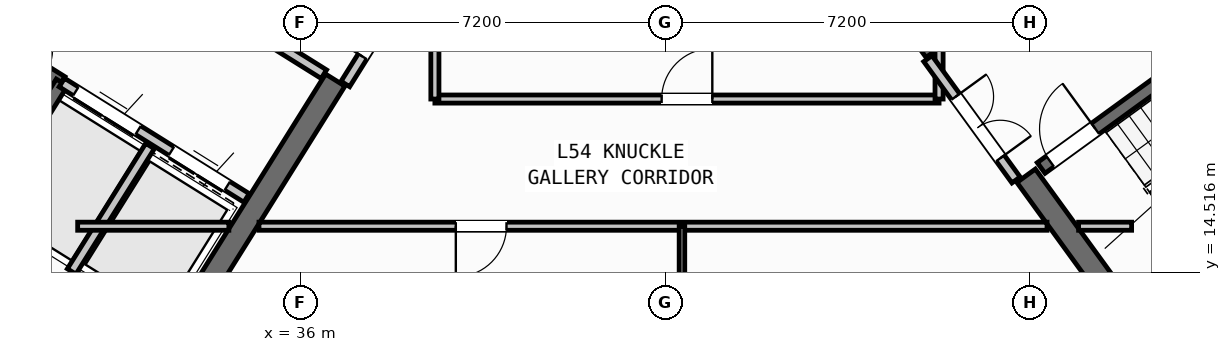
"""IFC4 building model, lengths in metres.
Left out: names, types, materials, properties, quantities, classifications, styles, units other than length and angle.
Written with IfcOpenShell. Run it as: python <this file> out.ifc"""

import sys

from ifc_helpers import new_model, si_unit, direction, frame, frame_2d, origin, place, context, subcontext, project, spatial, rectangle, extrude, source, transform, mapped, element, fill, save


model = new_model("IFC4")
c1 = context("Model", 3, precision=1e-05, world=origin(), true_north=direction((0.0, 1.0)))
c2 = subcontext(c1, "Body", "Model", "MODEL_VIEW")
j1 = project(units=[si_unit("LENGTHUNIT", "METRE"), si_unit("PLANEANGLEUNIT", "RADIAN")], contexts=[c1])
p1 = place(None, origin())
s1 = spatial("IfcSite", under=j1, at=p1, CompositionType="ELEMENT")
p2 = place(p1, origin())
s2 = spatial("IfcBuilding", under=s1, at=p2, CompositionType="ELEMENT")
p3 = place(p2, frame((0.0, 0.0, 214.8)))
s3 = spatial("IfcBuildingStorey", under=s2, at=p3, CompositionType="ELEMENT", Elevation=214.8)
p4 = place(p3, frame((33.324, 12.503, 0.0), z_axis=(0.0, 0.0, 1.0), x_axis=(-0.848043529849, 0.529926571782, 0.0)))
e1 = element("IfcWall", 1, at=p4, inside=s3, PredefinedType="SHEAR", context=c2, shape_type="SweptSolid", body=[
    extrude(rectangle(XDim=13.04, YDim=0.45, at=frame_2d((6.52, 0.0))), origin(), (0.0, 0.0, 1.0), 3.35),
])
p5 = place(p3, frame((36.683, 18.304, 0.0), z_axis=(0.0, 0.0, 1.0), x_axis=(-0.529904039071, -0.848057609704, 0.0)))
e2 = element("IfcWall", 2, at=p5, inside=s3, PredefinedType="SHEAR", context=c2, shape_type="SweptSolid", body=[
    extrude(rectangle(XDim=6.475, YDim=0.45, at=frame_2d((3.238, 0.0))), origin(), (0.0, 0.0, 1.0), 3.35),
])
p6 = place(p3, frame((52.399, 13.169, 0.0), z_axis=(0.0, 0.0, 1.0), x_axis=(0.809022352778, 0.587777877013, 0.0)))
e3 = element("IfcWall", 3, at=p6, inside=s3, PredefinedType="SHEAR", context=c2, shape_type="SweptSolid", body=[
    extrude(rectangle(XDim=12.24, YDim=0.45, at=frame_2d((6.12, 0.0))), origin(), (0.0, 0.0, 1.0), 3.35),
])
p7 = place(p3, frame((52.449, 13.483, 0.0), z_axis=(0.0, 0.0, 1.0), x_axis=(-0.587819244441, 0.808992296542, 0.0)))
e4 = element("IfcWall", 4, at=p7, inside=s3, PredefinedType="SHEAR", context=c2, shape_type="SweptSolid", body=[
    extrude(rectangle(XDim=3.625, YDim=0.45, at=frame_2d((1.812, 0.0))), origin(), (0.0, 0.0, 1.0), 3.35),
])
p8 = place(p3, frame((48.526, 18.884, 0.0), z_axis=(0.0, 0.0, 1.0), x_axis=(-0.587774812919, 0.809024578921, 0.0)))
e5 = element("IfcWall", 5, at=p8, inside=s3, PredefinedType="SHEAR", context=c2, shape_type="SweptSolid", body=[
    extrude(rectangle(XDim=6.475, YDim=0.45, at=frame_2d((3.238, 0.0))), origin(), (0.0, 0.0, 1.0), 3.35),
])
p9 = place(p3, frame((31.76, 12.183, 0.0), z_axis=(0.0, 0.0, 1.0), x_axis=(-0.848047074256, 0.529920899612, 0.0)))
e6 = element("IfcWall", 6, at=p9, inside=s3, PredefinedType="STANDARD", context=c2, shape_type="SweptSolid", body=[
    extrude(rectangle(XDim=30.652, YDim=0.32, at=frame_2d((15.326, 0.0))), origin(), (0.0, 0.0, 1.0), 3.35),
])
p10 = place(p9, frame((15.166, 0.0, 0.0)))
e7 = element("IfcOpeningElement", 7, at=p10, cuts=e6, PredefinedType="OPENING", context=c2, shape_type="SweptSolid", body=[
    extrude(rectangle(XDim=1.2, YDim=2.15, at=frame_2d((0.6, 1.075))), frame((0.0, 0.17, 0.0), z_axis=(0.0, -1.0, 0.0), x_axis=(1.0, 0.0, 0.0)), (0.0, 0.0, 1.0), 0.34),
])
p11 = place(p9, frame((2.24, 0.0, 0.9)))
e8 = element("IfcOpeningElement", 8, at=p11, cuts=e6, PredefinedType="OPENING", context=c2, shape_type="SweptSolid", body=[
    extrude(rectangle(XDim=1.65, YDim=1.45, at=frame_2d((0.825, 0.725))), frame((0.0, 0.17, 0.0), z_axis=(0.0, -1.0, 0.0), x_axis=(1.0, 0.0, 0.0)), (0.0, 0.0, 1.0), 0.34),
])
p12 = place(p9, frame((7.469, 0.0, 0.9)))
e9 = element("IfcOpeningElement", 9, at=p12, cuts=e6, PredefinedType="OPENING", context=c2, shape_type="SweptSolid", body=[
    extrude(rectangle(XDim=1.65, YDim=1.45, at=frame_2d((0.825, 0.725))), frame((0.0, 0.17, 0.0), z_axis=(0.0, -1.0, 0.0), x_axis=(1.0, 0.0, 0.0)), (0.0, 0.0, 1.0), 0.34),
])
p13 = place(p9, frame((12.623, 0.0, 1.0)))
e10 = element("IfcOpeningElement", 10, at=p13, cuts=e6, PredefinedType="OPENING", context=c2, shape_type="SweptSolid", body=[
    extrude(rectangle(XDim=0.9, YDim=1.25, at=frame_2d((0.45, 0.625))), frame((0.0, 0.17, 0.0), z_axis=(0.0, -1.0, 0.0), x_axis=(1.0, 0.0, 0.0)), (0.0, 0.0, 1.0), 0.34),
])
p14 = place(p9, frame((19.715, 0.0, 1.0)))
e11 = element("IfcOpeningElement", 11, at=p14, cuts=e6, PredefinedType="OPENING", context=c2, shape_type="SweptSolid", body=[
    extrude(rectangle(XDim=0.9, YDim=1.25, at=frame_2d((0.45, 0.625))), frame((0.0, 0.17, 0.0), z_axis=(0.0, -1.0, 0.0), x_axis=(1.0, 0.0, 0.0)), (0.0, 0.0, 1.0), 0.34),
])
p15 = place(p9, frame((25.566, 0.0, 0.9)))
e12 = element("IfcOpeningElement", 12, at=p15, cuts=e6, PredefinedType="OPENING", context=c2, shape_type="SweptSolid", body=[
    extrude(rectangle(XDim=1.65, YDim=1.45, at=frame_2d((0.825, 0.725))), frame((0.0, 0.17, 0.0), z_axis=(0.0, -1.0, 0.0), x_axis=(1.0, 0.0, 0.0)), (0.0, 0.0, 1.0), 0.34),
])
p16 = place(p9, frame((28.896, 0.0, 1.0)))
e13 = element("IfcOpeningElement", 13, at=p16, cuts=e6, PredefinedType="OPENING", context=c2, shape_type="SweptSolid", body=[
    extrude(rectangle(XDim=0.9, YDim=1.25, at=frame_2d((0.45, 0.625))), frame((0.0, 0.17, 0.0), z_axis=(0.0, -1.0, 0.0), x_axis=(1.0, 0.0, 0.0)), (0.0, 0.0, 1.0), 0.34),
])
p17 = place(p3, frame((31.28, 18.261, 0.0), z_axis=(0.0, 0.0, 1.0), x_axis=(-0.848051618787, 0.529913626805, 0.0)))
e14 = element("IfcWall", 14, at=p17, inside=s3, PredefinedType="SHEAR", context=c2, shape_type="SweptSolid", body=[
    extrude(rectangle(XDim=7.46, YDim=0.26, at=frame_2d((3.73, 0.0))), origin(), (0.0, 0.0, 1.0), 3.35),
])
p18 = place(p17, frame((0.36, 0.0, 0.0)))
e15 = element("IfcOpeningElement", 15, at=p18, cuts=e14, PredefinedType="OPENING", context=c2, shape_type="SweptSolid", body=[
    extrude(rectangle(XDim=0.86, YDim=2.05, at=frame_2d((0.43, 1.025))), frame((0.0, 0.14, 0.0), z_axis=(0.0, -1.0, 0.0), x_axis=(1.0, 0.0, 0.0)), (0.0, 0.0, 1.0), 0.28),
])
p19 = place(p3, frame((31.288, 18.256, 0.0), z_axis=(0.0, 0.0, 1.0), x_axis=(-0.529943379326, -0.848033026897, 0.0)))
e16 = element("IfcWall", 16, at=p19, inside=s3, PredefinedType="SHEAR", context=c2, shape_type="SweptSolid", body=[
    extrude(rectangle(XDim=3.16, YDim=0.26, at=frame_2d((1.58, 0.0))), origin(), (0.0, 0.0, 1.0), 3.35),
])
p20 = place(p3, frame((34.933, 15.978, 0.0), z_axis=(0.0, 0.0, 1.0), x_axis=(-0.848055739377, 0.529907032327, 0.0)))
e17 = element("IfcWall", 17, at=p20, inside=s3, PredefinedType="STANDARD", context=c2, shape_type="SweptSolid", body=[
    extrude(rectangle(XDim=4.298, YDim=0.2, at=frame_2d((2.149, 0.0))), origin(), (0.0, 0.0, 1.0), 3.34),
])
p21 = place(p20, frame((0.448, 0.0, 0.0)))
e18 = element("IfcOpeningElement", 18, at=p21, cuts=e17, PredefinedType="OPENING", context=c2, shape_type="SweptSolid", body=[
    extrude(rectangle(XDim=1.3, YDim=2.2, at=frame_2d((0.65, 1.1))), frame((0.0, 0.11, 0.0), z_axis=(0.0, -1.0, 0.0), x_axis=(1.0, 0.0, 0.0)), (0.0, 0.0, 1.0), 0.22),
])
p22 = place(p20, frame((2.523, 0.0, 0.0)))
e19 = element("IfcOpeningElement", 19, at=p22, cuts=e17, PredefinedType="OPENING", context=c2, shape_type="SweptSolid", body=[
    extrude(rectangle(XDim=1.45, YDim=2.25, at=frame_2d((0.725, 1.125))), frame((0.0, 0.11, 0.0), z_axis=(0.0, -1.0, 0.0), x_axis=(1.0, 0.0, 0.0)), (0.0, 0.0, 1.0), 0.22),
])
p23 = place(p3, frame((36.459, 18.421, 0.0), z_axis=(0.0, 0.0, 1.0), x_axis=(-0.848059591691, 0.529900867089, 0.0)))
e20 = element("IfcWall", 20, at=p23, inside=s3, PredefinedType="STANDARD", context=c2, shape_type="SweptSolid", body=[
    extrude(rectangle(XDim=5.818, YDim=0.2, at=frame_2d((2.909, 0.0))), origin(), (0.0, 0.0, 1.0), 3.34),
])
p24 = place(p23, frame((2.598, 0.0, 0.0)))
e21 = element("IfcOpeningElement", 21, at=p24, cuts=e20, PredefinedType="OPENING", context=c2, shape_type="SweptSolid", body=[
    extrude(rectangle(XDim=1.15, YDim=2.1, at=frame_2d((0.575, 1.05))), frame((0.0, 0.11, 0.0), z_axis=(0.0, -1.0, 0.0), x_axis=(1.0, 0.0, 0.0)), (0.0, 0.0, 1.0), 0.22),
])
p25 = place(p3, frame((33.029, 17.003, 0.0), z_axis=(0.0, 0.0, 1.0), x_axis=(-0.529916267533, -0.848049968695, 0.0)))
e22 = element("IfcWall", 22, at=p25, inside=s3, PredefinedType="STANDARD", context=c2, shape_type="SweptSolid", body=[
    extrude(rectangle(XDim=2.92, YDim=0.2, at=frame_2d((1.46, 0.0))), origin(), (0.0, 0.0, 1.0), 3.34),
])
p26 = place(p3, frame((52.472, 14.013, 0.0), z_axis=(0.0, 0.0, 1.0), x_axis=(0.809028366311, 0.587769599847, 0.0)))
e23 = element("IfcWall", 23, at=p26, inside=s3, PredefinedType="SHEAR", context=c2, shape_type="SweptSolid", body=[
    extrude(rectangle(XDim=7.33, YDim=0.26, at=frame_2d((3.665, 0.0))), origin(), (0.0, 0.0, 1.0), 3.35),
])
p27 = place(p3, frame((50.615, 16.57, 0.0), z_axis=(0.0, 0.0, 1.0), x_axis=(0.809028366311, 0.587769599847, 0.0)))
e24 = element("IfcWall", 24, at=p27, inside=s3, PredefinedType="SHEAR", context=c2, shape_type="SweptSolid", body=[
    extrude(rectangle(XDim=7.33, YDim=0.26, at=frame_2d((3.665, 0.0))), origin(), (0.0, 0.0, 1.0), 3.35),
])
p28 = place(p27, frame((0.22, 0.0, 0.0)))
e25 = element("IfcOpeningElement", 25, at=p28, cuts=e24, PredefinedType="OPENING", context=c2, shape_type="SweptSolid", body=[
    extrude(rectangle(XDim=1.1, YDim=2.1, at=frame_2d((0.55, 1.05))), frame((0.0, 0.14, 0.0), z_axis=(0.0, -1.0, 0.0), x_axis=(1.0, 0.0, 0.0)), (0.0, 0.0, 1.0), 0.28),
])
p29 = place(p3, frame((38.451, 20.737, 0.0), z_axis=(0.0, 0.0, 1.0), x_axis=(-0.529924799939, -0.848044637038, 0.0)))
e26 = element("IfcWall", 26, at=p29, inside=s3, PredefinedType="STANDARD", context=c2, shape_type="SweptSolid", body=[
    extrude(rectangle(XDim=2.96, YDim=0.2, at=frame_2d((1.48, 0.0))), origin(), (0.0, 0.0, 1.0), 3.34),
])
p30 = place(p29, frame((1.46, 0.0, 0.0)))
e27 = element("IfcOpeningElement", 27, at=p30, cuts=e26, PredefinedType="OPENING", context=c2, shape_type="SweptSolid", body=[
    extrude(rectangle(XDim=0.86, YDim=2.05, at=frame_2d((0.43, 1.025))), frame((0.0, 0.11, 0.0), z_axis=(0.0, -1.0, 0.0), x_axis=(1.0, 0.0, 0.0)), (0.0, 0.0, 1.0), 0.22),
])
p31 = place(p3, frame((31.6, 15.42, 0.0), z_axis=(0.0, 0.0, 1.0), x_axis=(1.0, 0.0, 0.0)))
e28 = element("IfcWall", 28, at=p31, inside=s3, PredefinedType="PARTITIONING", context=c2, shape_type="SweptSolid", body=[
    extrude(rectangle(XDim=2.984, YDim=0.16, at=frame_2d((1.492, 0.0))), origin(), (0.0, 0.0, 1.0), 3.34),
])
p32 = place(p3, frame((35.178, 15.42, 0.0), z_axis=(0.0, 0.0, 1.0), x_axis=(1.0, 0.0, 0.0)))
e29 = element("IfcWall", 29, at=p32, inside=s3, PredefinedType="PARTITIONING", context=c2, shape_type="SweptSolid", body=[
    extrude(rectangle(XDim=15.552, YDim=0.16, at=frame_2d((7.776, 0.0))), origin(), (0.0, 0.0, 1.0), 3.34),
])
p33 = place(p32, frame((3.885, 0.0, 0.0)))
e30 = element("IfcOpeningElement", 30, at=p33, cuts=e29, PredefinedType="OPENING", context=c2, shape_type="SweptSolid", body=[
    extrude(rectangle(XDim=1.0, YDim=2.1, at=frame_2d((0.5, 1.05))), frame((0.0, 0.09, 0.0), z_axis=(0.0, -1.0, 0.0), x_axis=(1.0, 0.0, 0.0)), (0.0, 0.0, 1.0), 0.18),
])
p34 = place(p3, frame((51.354, 15.42, 0.0), z_axis=(0.0, 0.0, 1.0), x_axis=(1.0, 0.0, 0.0)))
e31 = element("IfcWall", 31, at=p34, inside=s3, PredefinedType="PARTITIONING", context=c2, shape_type="SweptSolid", body=[
    extrude(rectangle(XDim=1.046, YDim=0.16, at=frame_2d((0.523, 0.0))), origin(), (0.0, 0.0, 1.0), 3.34),
])
p35 = place(p3, frame((38.65, 17.93, 0.0), z_axis=(0.0, 0.0, 1.0), x_axis=(1.0, 0.0, 0.0)))
e32 = element("IfcWall", 32, at=p35, inside=s3, PredefinedType="PARTITIONING", context=c2, shape_type="SweptSolid", body=[
    extrude(rectangle(XDim=9.95, YDim=0.16, at=frame_2d((4.975, 0.0))), origin(), (0.0, 0.0, 1.0), 3.34),
])
p36 = place(p35, frame((4.475, 0.0, 0.0)))
e33 = element("IfcOpeningElement", 33, at=p36, cuts=e32, PredefinedType="OPENING", context=c2, shape_type="SweptSolid", body=[
    extrude(rectangle(XDim=1.0, YDim=2.1, at=frame_2d((0.5, 1.05))), frame((0.0, 0.09, 0.0), z_axis=(0.0, -1.0, 0.0), x_axis=(1.0, 0.0, 0.0)), (0.0, 0.0, 1.0), 0.18),
])
p37 = place(p3, frame((38.65, 17.93, 0.0), z_axis=(0.0, 0.0, 1.0), x_axis=(0.0, 1.0, 0.0)))
e34 = element("IfcWall", 34, at=p37, inside=s3, PredefinedType="PARTITIONING", context=c2, shape_type="SweptSolid", body=[
    extrude(rectangle(XDim=3.046, YDim=0.16, at=frame_2d((1.523, 0.0))), origin(), (0.0, 0.0, 1.0), 3.34),
])
p38 = place(p3, frame((48.6, 17.93, 0.0), z_axis=(0.0, 0.0, 1.0), x_axis=(0.0, 1.0, 0.0)))
e35 = element("IfcWall", 35, at=p38, inside=s3, PredefinedType="PARTITIONING", context=c2, shape_type="SweptSolid", body=[
    extrude(rectangle(XDim=0.993, YDim=0.16, at=frame_2d((0.496, 0.0))), origin(), (0.0, 0.0, 1.0), 3.34),
])
p39 = place(p3, frame((50.119, 16.333, 0.0), z_axis=(0.0, 0.0, 1.0), x_axis=(-0.587749856981, 0.809042709391, 0.0)))
e36 = element("IfcWall", 36, at=p39, inside=s3, PredefinedType="STANDARD", context=c2, shape_type="SweptSolid", body=[
    extrude(rectangle(XDim=2.96, YDim=0.2, at=frame_2d((1.48, 0.0))), origin(), (0.0, 0.0, 1.0), 3.34),
])
p40 = place(p39, frame((0.53, 0.0, 0.0)))
e37 = element("IfcOpeningElement", 37, at=p40, cuts=e36, PredefinedType="OPENING", context=c2, shape_type="SweptSolid", body=[
    extrude(rectangle(XDim=1.5, YDim=2.15, at=frame_2d((0.75, 1.075))), frame((0.0, 0.11, 0.0), z_axis=(0.0, -1.0, 0.0), x_axis=(1.0, 0.0, 0.0)), (0.0, 0.0, 1.0), 0.22),
])
p41 = place(p3, frame((43.526, 1.96, 0.0), z_axis=(0.0, 0.0, 1.0), x_axis=(0.0, 1.0, 0.0)))
e38 = element("IfcWall", 38, at=p41, inside=s3, PredefinedType="PARTITIONING", context=c2, shape_type="SweptSolid", body=[
    extrude(rectangle(XDim=13.46, YDim=0.11, at=frame_2d((6.73, 0.0))), origin(), (0.0, 0.0, 1.0), 3.34),
])
p42 = place(p41, frame((5.5, 0.0, 0.0)))
e39 = element("IfcOpeningElement", 39, at=p42, cuts=e38, PredefinedType="OPENING", context=c2, shape_type="SweptSolid", body=[
    extrude(rectangle(XDim=0.92, YDim=2.08, at=frame_2d((0.46, 1.04))), frame((0.0, 0.065, 0.0), z_axis=(0.0, -1.0, 0.0), x_axis=(1.0, 0.0, 0.0)), (0.0, 0.0, 1.0), 0.13),
])
p43 = place(p41, frame((10.67, 0.0, 0.0)))
e40 = element("IfcOpeningElement", 40, at=p43, cuts=e38, PredefinedType="OPENING", context=c2, shape_type="SweptSolid", body=[
    extrude(rectangle(XDim=0.88, YDim=2.08, at=frame_2d((0.44, 1.04))), frame((0.0, 0.065, 0.0), z_axis=(0.0, -1.0, 0.0), x_axis=(1.0, 0.0, 0.0)), (0.0, 0.0, 1.0), 0.13),
])
m1 = source(origin(), c2, "Body", "SweptSolid", [
    extrude(rectangle(XDim=1.3, YDim=2.2, at=frame_2d((0.65, 1.1))), frame((0.0, 0.025, 0.0), z_axis=(0.0, -1.0, 0.0), x_axis=(1.0, 0.0, 0.0)), (0.0, 0.0, 1.0), 0.05),
])
p44 = place(p21, origin())
e41 = element("IfcDoor", 41, at=p44, inside=s3, OperationType="DOUBLE_DOOR_SLIDING", PredefinedType="DOOR", context=c2, shape_type="MappedRepresentation", body=[
    mapped(m1, transform((0.0, 0.0, 0.0), scale=1.0)),
])
fill(e18, e41)
m2 = source(origin(), c2, "Body", "SweptSolid", [
    extrude(rectangle(XDim=1.45, YDim=2.25, at=frame_2d((0.725, 1.125))), frame((0.0, 0.025, 0.0), z_axis=(0.0, -1.0, 0.0), x_axis=(1.0, 0.0, 0.0)), (0.0, 0.0, 1.0), 0.05),
])
p45 = place(p22, origin())
e42 = element("IfcDoor", 42, at=p45, inside=s3, OperationType="DOUBLE_DOOR_SLIDING", PredefinedType="DOOR", context=c2, shape_type="MappedRepresentation", body=[
    mapped(m2, transform((0.0, 0.0, 0.0), scale=1.0)),
])
fill(e19, e42)
m3 = source(origin(), c2, "Body", "SweptSolid", [
    extrude(rectangle(XDim=1.1, YDim=2.1, at=frame_2d((0.55, 1.05))), frame((0.0, 0.025, 0.0), z_axis=(0.0, -1.0, 0.0), x_axis=(1.0, 0.0, 0.0)), (0.0, 0.0, 1.0), 0.05),
])
p46 = place(p28, origin())
e43 = element("IfcDoor", 43, at=p46, inside=s3, OperationType="SINGLE_SWING_RIGHT", PredefinedType="DOOR", context=c2, shape_type="MappedRepresentation", body=[
    mapped(m3, transform((0.0, 0.0, 0.0), scale=1.0)),
])
fill(e25, e43)
m4 = source(origin(), c2, "Body", "SweptSolid", [
    extrude(rectangle(XDim=1.0, YDim=2.1, at=frame_2d((0.5, 1.05))), frame((0.0, 0.025, 0.0), z_axis=(0.0, -1.0, 0.0), x_axis=(1.0, 0.0, 0.0)), (0.0, 0.0, 1.0), 0.05),
])
p47 = place(p36, origin())
e44 = element("IfcDoor", 44, at=p47, inside=s3, OperationType="SINGLE_SWING_RIGHT", PredefinedType="DOOR", context=c2, shape_type="MappedRepresentation", body=[
    mapped(m4, transform((0.0, 0.0, 0.0), scale=1.0)),
])
fill(e33, e44)
m5 = source(origin(), c2, "Body", "SweptSolid", [
    extrude(rectangle(XDim=0.86, YDim=2.05, at=frame_2d((0.43, 1.025))), frame((0.0, 0.025, 0.0), z_axis=(0.0, -1.0, 0.0), x_axis=(1.0, 0.0, 0.0)), (0.0, 0.0, 1.0), 0.05),
])
p48 = place(p30, frame((0.86, 0.0, 0.0), z_axis=(0.0, 0.0, 1.0), x_axis=(-1.0, 0.0, 0.0)))
e45 = element("IfcDoor", 45, at=p48, inside=s3, OperationType="SINGLE_SWING_LEFT", PredefinedType="DOOR", context=c2, shape_type="MappedRepresentation", body=[
    mapped(m5, transform((0.0, 0.0, 0.0), scale=1.0)),
])
fill(e27, e45)
m6 = source(origin(), c2, "Body", "SweptSolid", [
    extrude(rectangle(XDim=1.5, YDim=2.15, at=frame_2d((0.75, 1.075))), frame((0.0, 0.025, 0.0), z_axis=(0.0, -1.0, 0.0), x_axis=(1.0, 0.0, 0.0)), (0.0, 0.0, 1.0), 0.05),
])
p49 = place(p40, frame((1.5, 0.0, 0.0), z_axis=(0.0, 0.0, 1.0), x_axis=(-1.0, 0.0, 0.0)))
e46 = element("IfcDoor", 46, at=p49, inside=s3, OperationType="DOUBLE_DOOR_SINGLE_SWING", PredefinedType="DOOR", context=c2, shape_type="MappedRepresentation", body=[
    mapped(m6, transform((0.0, 0.0, 0.0), scale=1.0)),
])
fill(e37, e46)
p50 = place(p33, frame((1.0, 0.0, 0.0), z_axis=(0.0, 0.0, 1.0), x_axis=(-1.0, 0.0, 0.0)))
e47 = element("IfcDoor", 47, at=p50, inside=s3, OperationType="SINGLE_SWING_RIGHT", PredefinedType="DOOR", context=c2, shape_type="MappedRepresentation", body=[
    mapped(m4, transform((0.0, 0.0, 0.0), scale=1.0)),
])
fill(e30, e47)
save(model, sys.argv[1])
